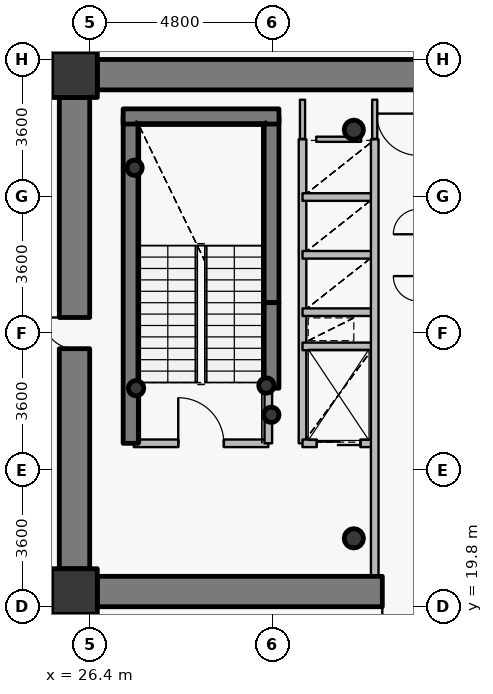
"""IFC4 building model, lengths in metres.
Left out: names, types, materials, properties, quantities, classifications, styles, units other than length and angle.
Written with IfcOpenShell. Run it as: python <this file> out.ifc"""

import sys

from ifc_helpers import new_model, si_unit, direction, frame, frame_2d, origin, origin_2d, place, context, subcontext, project, spatial, rectangle, hollow_circle, extrude, source, transform, mapped, element, fill, save


model = new_model("IFC4")
c1 = context("Model", 3, precision=1e-05, world=origin(), true_north=direction((0.0, 1.0)))
c2 = subcontext(c1, "Body", "Model", "MODEL_VIEW")
j1 = project(units=[si_unit("LENGTHUNIT", "METRE"), si_unit("PLANEANGLEUNIT", "RADIAN")], contexts=[c1])
p1 = place(None, origin())
s1 = spatial("IfcSite", under=j1, at=p1, CompositionType="ELEMENT")
p2 = place(p1, origin())
s2 = spatial("IfcBuilding", under=s1, at=p2, CompositionType="ELEMENT")
p3 = place(p2, frame((0.0, 0.0, 134.7)))
s3 = spatial("IfcBuildingStorey", under=s2, at=p3, CompositionType="ELEMENT", Elevation=134.7)
for number, where, z_axis, x_axis in (
    (1, (26.0, 20.2, 0.0), (0.0, 0.0, 1.0), (1.0, 0.0, 0.0)),
    (2, (26.0, 33.8, 0.0), (0.0, 0.0, 1.0), (1.0, 0.0, 0.0)),
):
    element("IfcColumn", number, at=place(p3, frame(where, z_axis=z_axis, x_axis=x_axis)), inside=s3, PredefinedType="COLUMN", context=c2, shape_type="SweptSolid", body=[
        extrude(rectangle(XDim=1.2, YDim=1.2, at=origin_2d()), origin(), (0.0, 0.0, 1.0), 3.75),
    ])
for number, where, z_axis, x_axis in (
    (3, (33.35, 21.6, 0.0), (0.0, 0.0, 1.0), (1.0, 0.0, 0.0)),
    (4, (33.35, 32.35, 0.0), (0.0, 0.0, 1.0), (1.0, 0.0, 0.0)),
):
    element("IfcColumn", number, at=place(p3, frame(where, z_axis=z_axis, x_axis=x_axis)), inside=s3, PredefinedType="COLUMN", context=c2, shape_type="SweptSolid", body=[
        extrude(hollow_circle(Radius=0.254, WallThickness=0.02, at=origin_2d()), origin(), (0.0, 0.0, 1.0), 3.75),
    ])
p4 = place(p3, frame((27.48, 24.1, 0.0), z_axis=(0.0, 0.0, 1.0), x_axis=(0.0, 1.0, 0.0)))
e5 = element("IfcWall", 5, at=p4, inside=s3, PredefinedType="SHEAR", context=c2, shape_type="SweptSolid", body=[
    extrude(rectangle(XDim=8.6, YDim=0.4, at=frame_2d((4.3, 0.0))), origin(), (0.0, 0.0, 1.0), 3.75),
])
p5 = place(p3, frame((31.18, 27.8, 0.0), z_axis=(0.0, 0.0, 1.0), x_axis=(0.0, 1.0, 0.0)))
e6 = element("IfcWall", 6, at=p5, inside=s3, PredefinedType="SHEAR", context=c2, shape_type="SweptSolid", body=[
    extrude(rectangle(XDim=4.9, YDim=0.4, at=frame_2d((2.45, 0.0))), origin(), (0.0, 0.0, 1.0), 3.75),
])
p6 = place(p3, frame((27.28, 32.7, 0.0), z_axis=(0.0, 0.0, 1.0), x_axis=(1.0, 0.0, 0.0)))
e7 = element("IfcWall", 7, at=p6, inside=s3, PredefinedType="SHEAR", context=c2, shape_type="SweptSolid", body=[
    extrude(rectangle(XDim=4.1, YDim=0.4, at=frame_2d((2.05, 0.0))), origin(), (0.0, 0.0, 1.0), 3.75),
])
for number, where, z_axis, x_axis in (
    (8, (27.58, 31.35, 0.0), (0.0, 0.0, 1.0), (1.0, 0.0, 0.0)),
    (9, (31.05, 25.62, 0.0), (0.0, 0.0, 1.0), (1.0, 0.0, 0.0)),
    (10, (31.18, 24.85, 0.0), (0.0, 0.0, 1.0), (1.0, 0.0, 0.0)),
    (11, (27.62, 25.55, 0.0), (0.0, 0.0, 1.0), (1.0, 0.0, 0.0)),
):
    element("IfcColumn", number, at=place(p3, frame(where, z_axis=z_axis, x_axis=x_axis)), inside=s3, PredefinedType="COLUMN", context=c2, shape_type="SweptSolid", body=[
        extrude(hollow_circle(Radius=0.203, WallThickness=0.016, at=origin_2d()), origin(), (0.0, 0.0, 1.0), 3.75),
    ])
p7 = place(p3, frame((26.6, 33.8, 0.0), z_axis=(0.0, 0.0, 1.0), x_axis=(1.0, 0.0, 0.0)))
e12 = element("IfcWall", 12, at=p7, inside=s3, PredefinedType="SHEAR", context=c2, shape_type="SweptSolid", body=[
    extrude(rectangle(XDim=18.8, YDim=0.8, at=frame_2d((9.4, 0.0))), origin(), (0.0, 0.0, 1.0), 2.95),
])
p8 = place(p3, frame((45.4, 20.2, 0.0), z_axis=(0.0, 0.0, 1.0), x_axis=(-1.0, 0.0, 0.0)))
e13 = element("IfcWall", 13, at=p8, inside=s3, PredefinedType="SHEAR", context=c2, shape_type="SweptSolid", body=[
    extrude(rectangle(XDim=18.8, YDim=0.8, at=frame_2d((9.4, 0.0))), origin(), (0.0, 0.0, 1.0), 2.95),
])
p9 = place(p8, frame((10.15, 0.0, 0.0)))
e14 = element("IfcOpeningElement", 14, at=p9, cuts=e13, PredefinedType="OPENING", context=c2, shape_type="SweptSolid", body=[
    extrude(rectangle(XDim=1.15, YDim=2.15, at=origin_2d()), frame((0.575, 0.41, 1.075), z_axis=(0.0, -1.0, 0.0), x_axis=(1.0, 0.0, 0.0)), (0.0, 0.0, 1.0), 0.82),
])
p10 = place(p3, frame((26.0, 20.8, 0.0), z_axis=(0.0, 0.0, 1.0), x_axis=(0.0, 1.0, 0.0)))
e15 = element("IfcWall", 15, at=p10, inside=s3, PredefinedType="SHEAR", context=c2, shape_type="SweptSolid", body=[
    extrude(rectangle(XDim=12.4, YDim=0.8, at=frame_2d((6.2, 0.0))), origin(), (0.0, 0.0, 1.0), 2.95),
])
p11 = place(p10, frame((5.79, 0.0, 0.0)))
e16 = element("IfcOpeningElement", 16, at=p11, cuts=e15, PredefinedType="OPENING", context=c2, shape_type="SweptSolid", body=[
    extrude(rectangle(XDim=0.82, YDim=2.1, at=origin_2d()), frame((0.41, 0.41, 1.05), z_axis=(0.0, -1.0, 0.0), x_axis=(1.0, 0.0, 0.0)), (0.0, 0.0, 1.0), 0.82),
])
p12 = place(p3, frame((31.18, 25.55, 0.0), z_axis=(0.0, 0.0, 1.0), x_axis=(0.0, 1.0, 0.0)))
e17 = element("IfcWall", 17, at=p12, inside=s3, PredefinedType="SHEAR", context=c2, shape_type="SweptSolid", body=[
    extrude(rectangle(XDim=2.25, YDim=0.4, at=frame_2d((1.125, 0.0))), origin(), (0.0, 0.0, 1.0), 3.1),
])
p13 = place(p3, frame((27.56, 24.1, 0.0), z_axis=(0.0, 0.0, 1.0), x_axis=(1.0, 0.0, 0.0)))
e18 = element("IfcWall", 18, at=p13, inside=s3, PredefinedType="PARTITIONING", context=c2, shape_type="SweptSolid", body=[
    extrude(rectangle(XDim=3.54, YDim=0.2, at=frame_2d((1.77, 0.0))), origin(), (0.0, 0.0, 1.0), 3.5),
])
p14 = place(p13, frame((1.17, 0.0, 0.0)))
e19 = element("IfcOpeningElement", 19, at=p14, cuts=e18, PredefinedType="OPENING", context=c2, shape_type="SweptSolid", body=[
    extrude(rectangle(XDim=1.2, YDim=2.15, at=origin_2d()), frame((0.6, 0.11, 1.075), z_axis=(0.0, -1.0, 0.0), x_axis=(1.0, 0.0, 0.0)), (0.0, 0.0, 1.0), 0.22),
])
p15 = place(p3, frame((31.1, 24.1, 0.0), z_axis=(0.0, 0.0, 1.0), x_axis=(0.0, 1.0, 0.0)))
e20 = element("IfcWall", 20, at=p15, inside=s3, PredefinedType="PARTITIONING", context=c2, shape_type="SweptSolid", body=[
    extrude(rectangle(XDim=1.44, YDim=0.2, at=frame_2d((0.72, 0.0))), origin(), (0.0, 0.0, 1.0), 3.5),
])
p16 = place(p3, frame((32.0, 24.1, 0.0), z_axis=(0.0, 0.0, 1.0), x_axis=(0.0, 1.0, 0.0)))
e21 = element("IfcWall", 21, at=p16, inside=s3, PredefinedType="PARTITIONING", context=c2, shape_type="SweptSolid", body=[
    extrude(rectangle(XDim=8.0, YDim=0.2, at=frame_2d((4.0, 0.0))), origin(), (0.0, 0.0, 1.0), 3.5),
])
p17 = place(p3, frame((32.0, 24.1, 0.0), z_axis=(0.0, 0.0, 1.0), x_axis=(1.0, 0.0, 0.0)))
e22 = element("IfcWall", 22, at=p17, inside=s3, PredefinedType="PARTITIONING", context=c2, shape_type="SweptSolid", body=[
    extrude(rectangle(XDim=1.9, YDim=0.2, at=frame_2d((0.95, 0.0))), origin(), (0.0, 0.0, 1.0), 3.085),
])
p18 = place(p17, frame((0.375, 0.0, 0.0)))
e23 = element("IfcOpeningElement", 23, at=p18, cuts=e22, PredefinedType="OPENING", context=c2, shape_type="SweptSolid", body=[
    extrude(rectangle(XDim=1.15, YDim=2.15, at=origin_2d()), frame((0.575, 0.11, 1.075), z_axis=(0.0, -1.0, 0.0), x_axis=(1.0, 0.0, 0.0)), (0.0, 0.0, 1.0), 0.22),
])
for number, where, z_axis, x_axis in (
    (24, (32.0, 26.65, 0.0), (0.0, 0.0, 1.0), (1.0, 0.0, 0.0)),
    (25, (32.0, 27.55, 0.0), (0.0, 0.0, 1.0), (1.0, 0.0, 0.0)),
    (26, (32.0, 29.06, 0.0), (0.0, 0.0, 1.0), (1.0, 0.0, 0.0)),
    (27, (32.0, 30.58, 0.0), (0.0, 0.0, 1.0), (1.0, 0.0, 0.0)),
):
    element("IfcWall", number, at=place(p3, frame(where, z_axis=z_axis, x_axis=x_axis)), inside=s3, PredefinedType="PARTITIONING", context=c2, shape_type="SweptSolid", body=[
        extrude(rectangle(XDim=1.9, YDim=0.2, at=frame_2d((0.95, 0.0))), origin(), (0.0, 0.0, 1.0), 3.085),
    ])
p19 = place(p3, frame((33.9, 20.6, 0.0), z_axis=(0.0, 0.0, 1.0), x_axis=(0.0, 1.0, 0.0)))
e28 = element("IfcWall", 28, at=p19, inside=s3, PredefinedType="PARTITIONING", context=c2, shape_type="SweptSolid", body=[
    extrude(rectangle(XDim=11.5, YDim=0.2, at=frame_2d((5.75, 0.0))), origin(), (0.0, 0.0, 1.0), 3.085),
])
p20 = place(p3, frame((32.36, 32.1, 0.0), z_axis=(0.0, 0.0, 1.0), x_axis=(1.0, 0.0, 0.0)))
e29 = element("IfcWall", 29, at=p20, inside=s3, PredefinedType="PARTITIONING", context=c2, shape_type="SweptSolid", body=[
    extrude(rectangle(XDim=1.18, YDim=0.135, at=frame_2d((0.59, 0.0))), origin(), (0.0, 0.0, 1.0), 3.085),
])
p21 = place(p3, frame((32.0, 33.14, 0.0), z_axis=(0.0, 0.0, 1.0), x_axis=(0.0, -1.0, 0.0)))
e30 = element("IfcWall", 30, at=p21, inside=s3, PredefinedType="PARTITIONING", context=c2, shape_type="SweptSolid", body=[
    extrude(rectangle(XDim=1.03, YDim=0.135, at=frame_2d((0.515, 0.0))), origin(), (0.0, 0.0, 1.0), 3.035),
])
p22 = place(p3, frame((33.9, 32.11, 0.0), z_axis=(0.0, 0.0, 1.0), x_axis=(0.0, 1.0, 0.0)))
e31 = element("IfcWall", 31, at=p22, inside=s3, PredefinedType="PARTITIONING", context=c2, shape_type="SweptSolid", body=[
    extrude(rectangle(XDim=1.03, YDim=0.135, at=frame_2d((0.515, 0.0))), origin(), (0.0, 0.0, 1.0), 3.085),
])
p23 = place(p3, frame((26.59, 34.2, 0.0), z_axis=(0.0, 0.0, 1.0), x_axis=(-1.0, 0.0, 0.0)))
e32 = element("IfcWall", 32, at=p23, inside=s3, PredefinedType="PARTITIONING", context=c2, shape_type="SweptSolid", body=[
    extrude(rectangle(XDim=0.99, YDim=0.135, at=frame_2d((0.495, 0.0))), origin(), (0.0, 0.0, 1.0), 2.935),
])
p24 = place(p3, frame((25.6, 33.893, 0.0), z_axis=(0.0, 0.0, 1.0), x_axis=(0.0, -1.0, 0.0)))
e33 = element("IfcWall", 33, at=p24, inside=s3, PredefinedType="PARTITIONING", context=c2, shape_type="SweptSolid", body=[
    extrude(rectangle(XDim=0.683, YDim=0.135, at=frame_2d((0.341, 0.0))), origin(), (0.0, 0.0, 1.0), 3.5),
])
p25 = place(p3, frame((25.6, 20.79, 0.0), z_axis=(0.0, 0.0, 1.0), x_axis=(0.0, -1.0, 0.0)))
e34 = element("IfcWall", 34, at=p25, inside=s3, PredefinedType="PARTITIONING", context=c2, shape_type="SweptSolid", body=[
    extrude(rectangle(XDim=0.99, YDim=0.135, at=frame_2d((0.495, 0.0))), origin(), (0.0, 0.0, 1.0), 3.5),
])
p26 = place(p3, frame((25.907, 19.8, 0.0), z_axis=(0.0, 0.0, 1.0), x_axis=(1.0, 0.0, 0.0)))
e35 = element("IfcWall", 35, at=p26, inside=s3, PredefinedType="PARTITIONING", context=c2, shape_type="SweptSolid", body=[
    extrude(rectangle(XDim=0.683, YDim=0.135, at=frame_2d((0.341, 0.0))), origin(), (0.0, 0.0, 1.0), 2.935),
])
m1 = source(origin(), c2, "Body", "SweptSolid", [
    extrude(rectangle(XDim=0.82, YDim=2.1, at=origin_2d()), frame((0.41, 0.025, 1.05), z_axis=(0.0, -1.0, 0.0), x_axis=(1.0, 0.0, 0.0)), (0.0, 0.0, 1.0), 0.05),
])
p27 = place(p11, origin())
e36 = element("IfcDoor", 36, at=p27, inside=s3, OperationType="SINGLE_SWING_RIGHT", PredefinedType="DOOR", context=c2, shape_type="MappedRepresentation", body=[
    mapped(m1, transform((0.0, 0.0, 0.0), x_axis=(1.0, 0.0, 0.0), y_axis=(0.0, 1.0, 0.0), z_axis=(0.0, 0.0, 1.0), scale=1.0)),
])
fill(e16, e36)
m2 = source(origin(), c2, "Body", "SweptSolid", [
    extrude(rectangle(XDim=1.15, YDim=2.15, at=origin_2d()), frame((0.575, 0.025, 1.075), z_axis=(0.0, -1.0, 0.0), x_axis=(1.0, 0.0, 0.0)), (0.0, 0.0, 1.0), 0.05),
])
p28 = place(p9, origin())
e37 = element("IfcDoor", 37, at=p28, inside=s3, OperationType="SINGLE_SWING_RIGHT", PredefinedType="DOOR", context=c2, shape_type="MappedRepresentation", body=[
    mapped(m2, transform((0.0, 0.0, 0.0), x_axis=(1.0, 0.0, 0.0), y_axis=(0.0, 1.0, 0.0), z_axis=(0.0, 0.0, 1.0), scale=1.0)),
])
fill(e14, e37)
m3 = source(origin(), c2, "Body", "SweptSolid", [
    extrude(rectangle(XDim=1.2, YDim=2.15, at=origin_2d()), frame((0.6, 0.025, 1.075), z_axis=(0.0, -1.0, 0.0), x_axis=(1.0, 0.0, 0.0)), (0.0, 0.0, 1.0), 0.05),
])
p29 = place(p14, origin())
e38 = element("IfcDoor", 38, at=p29, inside=s3, OperationType="SINGLE_SWING_LEFT", PredefinedType="DOOR", context=c2, shape_type="MappedRepresentation", body=[
    mapped(m3, transform((0.0, 0.0, 0.0), x_axis=(1.0, 0.0, 0.0), y_axis=(0.0, 1.0, 0.0), z_axis=(0.0, 0.0, 1.0), scale=1.0)),
])
fill(e19, e38)
m4 = source(origin(), c2, "Body", "SweptSolid", [
    extrude(rectangle(XDim=1.15, YDim=2.15, at=origin_2d()), frame((0.575, 0.025, 1.075), z_axis=(0.0, -1.0, 0.0), x_axis=(1.0, 0.0, 0.0)), (0.0, 0.0, 1.0), 0.05),
])
p30 = place(p18, origin())
e39 = element("IfcDoor", 39, at=p30, inside=s3, OperationType="DOUBLE_DOOR_SLIDING", PredefinedType="USERDEFINED", context=c2, shape_type="MappedRepresentation", body=[
    mapped(m4, transform((0.0, 0.0, 0.0), x_axis=(1.0, 0.0, 0.0), y_axis=(0.0, 1.0, 0.0), z_axis=(0.0, 0.0, 1.0), scale=1.0)),
])
fill(e23, e39)
save(model, sys.argv[1])
